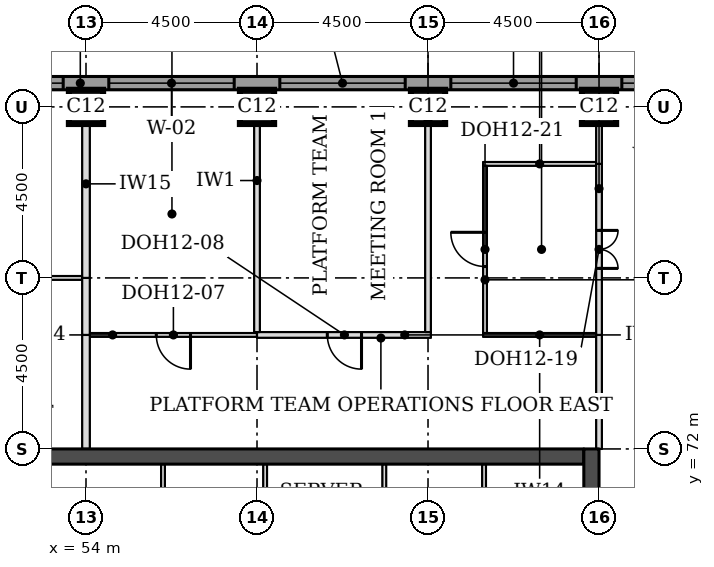
"""IFC4 building model, lengths in metres.
Left out: names, types, materials, properties, quantities, classifications, styles, units other than length and angle.
Written with IfcOpenShell. Run it as: python <this file> out.ifc"""

import sys

from ifc_helpers import new_model, si_unit, direction, frame, frame_2d, origin, origin_2d, place, context, subcontext, project, spatial, rectangle, extrude, element, fill, save


model = new_model("IFC4")
c1 = context("Model", 3, precision=1e-05, world=origin(), true_north=direction((0.0, 1.0)))
c2 = subcontext(c1, "Body", "Model", "MODEL_VIEW")
j1 = project(units=[si_unit("LENGTHUNIT", "METRE"), si_unit("PLANEANGLEUNIT", "RADIAN")], contexts=[c1])
p1 = place(None, origin())
s1 = spatial("IfcSite", under=j1, at=p1, CompositionType="ELEMENT")
p2 = place(p1, origin())
s2 = spatial("IfcBuilding", under=s1, at=p2, CompositionType="ELEMENT")
p3 = place(p2, frame((0.0, 0.0, 248.9)))
s3 = spatial("IfcBuildingStorey", under=s2, at=p3, CompositionType="ELEMENT", Elevation=248.9)
for number, where, z_axis, x_axis in (
    (1, (54.0, 81.0, 0.0), (0.0, 0.0, 1.0), (1.0, 0.0, 0.0)),
    (2, (58.5, 81.0, 0.0), (0.0, 0.0, 1.0), (1.0, 0.0, 0.0)),
    (3, (63.0, 81.0, 0.0), (0.0, 0.0, 1.0), (1.0, 0.0, 0.0)),
    (4, (67.5, 81.0, 0.0), (0.0, 0.0, 1.0), (1.0, 0.0, 0.0)),
):
    element("IfcColumn", number, at=place(p3, frame(where, z_axis=z_axis, x_axis=x_axis)), inside=s3, PredefinedType="COLUMN", context=c2, shape_type="SweptSolid", body=[
        extrude(rectangle(XDim=0.9, YDim=0.9, at=origin_2d()), origin(), (0.0, 0.0, 1.0), 3.7),
    ])
p4 = place(p3, frame((45.4, 71.8, 0.0), z_axis=(0.0, 0.0, 1.0), x_axis=(1.0, 0.0, 0.0)))
e5 = element("IfcWall", 5, at=p4, inside=s3, PredefinedType="SHEAR", context=c2, shape_type="SweptSolid", body=[
    extrude(rectangle(XDim=21.7, YDim=0.4, at=frame_2d((10.85, 0.0))), origin(), (0.0, 0.0, 1.0), 3.7),
])
p5 = place(p3, frame((67.3, 49.5, 0.0), z_axis=(0.0, 0.0, 1.0), x_axis=(0.0, 1.0, 0.0)))
e6 = element("IfcWall", 6, at=p5, inside=s3, PredefinedType="SHEAR", context=c2, shape_type="SweptSolid", body=[
    extrude(rectangle(XDim=22.5, YDim=0.4, at=frame_2d((11.25, 0.0))), origin(), (0.0, 0.0, 1.0), 3.7),
])
p6 = place(p5, frame((4.2, 0.0, 0.0)))
e7 = element("IfcOpeningElement", 7, at=p6, cuts=e6, PredefinedType="OPENING", context=c2, shape_type="SweptSolid", body=[
    extrude(rectangle(XDim=1.8, YDim=2.1, at=frame_2d((0.9, 1.05))), frame((0.0, 0.21, 0.0), z_axis=(0.0, -1.0, 0.0), x_axis=(1.0, 0.0, 0.0)), (0.0, 0.0, 1.0), 0.42),
])
p7 = place(p5, frame((6.9, 0.0, 0.0)))
e8 = element("IfcOpeningElement", 8, at=p7, cuts=e6, PredefinedType="OPENING", context=c2, shape_type="SweptSolid", body=[
    extrude(rectangle(XDim=1.1, YDim=2.1, at=frame_2d((0.55, 1.05))), frame((0.0, 0.21, 0.0), z_axis=(0.0, -1.0, 0.0), x_axis=(1.0, 0.0, 0.0)), (0.0, 0.0, 1.0), 0.42),
])
p8 = place(p5, frame((13.6, 0.0, 0.0)))
e9 = element("IfcOpeningElement", 9, at=p8, cuts=e6, PredefinedType="OPENING", context=c2, shape_type="SweptSolid", body=[
    extrude(rectangle(XDim=1.1, YDim=2.1, at=frame_2d((0.55, 1.05))), frame((0.0, 0.21, 0.0), z_axis=(0.0, -1.0, 0.0), x_axis=(1.0, 0.0, 0.0)), (0.0, 0.0, 1.0), 0.42),
])
p9 = place(p5, frame((16.5, 0.0, 0.0)))
e10 = element("IfcOpeningElement", 10, at=p9, cuts=e6, PredefinedType="OPENING", context=c2, shape_type="SweptSolid", body=[
    extrude(rectangle(XDim=1.8, YDim=2.1, at=frame_2d((0.9, 1.05))), frame((0.0, 0.21, 0.0), z_axis=(0.0, -1.0, 0.0), x_axis=(1.0, 0.0, 0.0)), (0.0, 0.0, 1.0), 0.42),
])
p10 = place(p3, frame((72.331, 81.625, 0.0), z_axis=(0.0, 0.0, 1.0), x_axis=(-1.0, 0.0, 0.0)))
e11 = element("IfcWall", 11, at=p10, inside=s3, PredefinedType="STANDARD", context=c2, shape_type="SweptSolid", body=[
    extrude(rectangle(XDim=32.163, YDim=0.35, at=frame_2d((16.081, 0.0))), origin(), (0.0, 0.0, 1.0), 3.525),
])
p11 = place(p10, frame((0.931, 0.0, 0.9)))
e12 = element("IfcOpeningElement", 12, at=p11, cuts=e11, PredefinedType="OPENING", context=c2, shape_type="SweptSolid", body=[
    extrude(rectangle(XDim=3.3, YDim=1.9, at=frame_2d((1.65, 0.95))), frame((0.0, 0.185, 0.0), z_axis=(0.0, -1.0, 0.0), x_axis=(1.0, 0.0, 0.0)), (0.0, 0.0, 1.0), 0.37),
])
p12 = place(p10, frame((5.431, 0.0, 0.9)))
e13 = element("IfcOpeningElement", 13, at=p12, cuts=e11, PredefinedType="OPENING", context=c2, shape_type="SweptSolid", body=[
    extrude(rectangle(XDim=3.3, YDim=1.9, at=frame_2d((1.65, 0.95))), frame((0.0, 0.185, 0.0), z_axis=(0.0, -1.0, 0.0), x_axis=(1.0, 0.0, 0.0)), (0.0, 0.0, 1.0), 0.37),
])
p13 = place(p10, frame((9.931, 0.0, 0.9)))
e14 = element("IfcOpeningElement", 14, at=p13, cuts=e11, PredefinedType="OPENING", context=c2, shape_type="SweptSolid", body=[
    extrude(rectangle(XDim=3.3, YDim=1.9, at=frame_2d((1.65, 0.95))), frame((0.0, 0.185, 0.0), z_axis=(0.0, -1.0, 0.0), x_axis=(1.0, 0.0, 0.0)), (0.0, 0.0, 1.0), 0.37),
])
p14 = place(p10, frame((14.431, 0.0, 0.9)))
e15 = element("IfcOpeningElement", 15, at=p14, cuts=e11, PredefinedType="OPENING", context=c2, shape_type="SweptSolid", body=[
    extrude(rectangle(XDim=3.3, YDim=1.9, at=frame_2d((1.65, 0.95))), frame((0.0, 0.185, 0.0), z_axis=(0.0, -1.0, 0.0), x_axis=(1.0, 0.0, 0.0)), (0.0, 0.0, 1.0), 0.37),
])
p15 = place(p10, frame((18.931, 0.0, 0.9)))
e16 = element("IfcOpeningElement", 16, at=p15, cuts=e11, PredefinedType="OPENING", context=c2, shape_type="SweptSolid", body=[
    extrude(rectangle(XDim=3.3, YDim=1.9, at=frame_2d((1.65, 0.95))), frame((0.0, 0.185, 0.0), z_axis=(0.0, -1.0, 0.0), x_axis=(1.0, 0.0, 0.0)), (0.0, 0.0, 1.0), 0.37),
])
p16 = place(p10, frame((23.431, 0.0, 0.9)))
e17 = element("IfcOpeningElement", 17, at=p16, cuts=e11, PredefinedType="OPENING", context=c2, shape_type="SweptSolid", body=[
    extrude(rectangle(XDim=3.3, YDim=1.9, at=frame_2d((1.65, 0.95))), frame((0.0, 0.185, 0.0), z_axis=(0.0, -1.0, 0.0), x_axis=(1.0, 0.0, 0.0)), (0.0, 0.0, 1.0), 0.37),
])
p17 = place(p10, frame((27.931, 0.0, 0.9)))
e18 = element("IfcOpeningElement", 18, at=p17, cuts=e11, PredefinedType="OPENING", context=c2, shape_type="SweptSolid", body=[
    extrude(rectangle(XDim=3.3, YDim=1.9, at=frame_2d((1.65, 0.95))), frame((0.0, 0.185, 0.0), z_axis=(0.0, -1.0, 0.0), x_axis=(1.0, 0.0, 0.0)), (0.0, 0.0, 1.0), 0.37),
])
p18 = place(p3, frame((54.1, 75.0, 0.0), z_axis=(0.0, 0.0, 1.0), x_axis=(1.0, 0.0, 0.0)))
e19 = element("IfcWall", 19, at=p18, inside=s3, PredefinedType="PARTITIONING", context=c2, shape_type="SweptSolid", body=[
    extrude(rectangle(XDim=4.4, YDim=0.1, at=frame_2d((2.2, 0.0))), origin(), (0.0, 0.0, 1.0), 3.55),
])
p19 = place(p18, frame((1.75, 0.0, 0.0)))
e20 = element("IfcOpeningElement", 20, at=p19, cuts=e19, PredefinedType="OPENING", context=c2, shape_type="SweptSolid", body=[
    extrude(rectangle(XDim=0.9, YDim=2.1, at=frame_2d((0.45, 1.05))), frame((0.0, 0.06, 0.0), z_axis=(0.0, -1.0, 0.0), x_axis=(1.0, 0.0, 0.0)), (0.0, 0.0, 1.0), 0.12),
])
p20 = place(p3, frame((58.5, 75.0, 0.0), z_axis=(0.0, 0.0, 1.0), x_axis=(1.0, 0.0, 0.0)))
e21 = element("IfcWall", 21, at=p20, inside=s3, PredefinedType="PARTITIONING", context=c2, shape_type="SweptSolid", body=[
    extrude(rectangle(XDim=4.575, YDim=0.15, at=frame_2d((2.288, 0.0))), origin(), (0.0, 0.0, 1.0), 3.55),
])
p21 = place(p20, frame((1.85, 0.0, 0.0)))
e22 = element("IfcOpeningElement", 22, at=p21, cuts=e21, PredefinedType="OPENING", context=c2, shape_type="SweptSolid", body=[
    extrude(rectangle(XDim=0.9, YDim=2.1, at=frame_2d((0.45, 1.05))), frame((0.0, 0.085, 0.0), z_axis=(0.0, -1.0, 0.0), x_axis=(1.0, 0.0, 0.0)), (0.0, 0.0, 1.0), 0.17),
])
p22 = place(p3, frame((64.45, 75.0, 0.0), z_axis=(0.0, 0.0, 1.0), x_axis=(1.0, 0.0, 0.0)))
e23 = element("IfcWall", 23, at=p22, inside=s3, PredefinedType="PARTITIONING", context=c2, shape_type="SweptSolid", body=[
    extrude(rectangle(XDim=2.975, YDim=0.1, at=frame_2d((1.488, 0.0))), origin(), (0.0, 0.0, 1.0), 3.55),
])
p23 = place(p3, frame((49.45, 76.5, 0.0), z_axis=(0.0, 0.0, 1.0), x_axis=(1.0, 0.0, 0.0)))
e24 = element("IfcWall", 24, at=p23, inside=s3, PredefinedType="PARTITIONING", context=c2, shape_type="SweptSolid", body=[
    extrude(rectangle(XDim=4.45, YDim=0.1, at=frame_2d((2.225, 0.0))), origin(), (0.0, 0.0, 1.0), 3.55),
])
p24 = place(p3, frame((64.45, 79.5, 0.0), z_axis=(0.0, 0.0, 1.0), x_axis=(1.0, 0.0, 0.0)))
e25 = element("IfcWall", 25, at=p24, inside=s3, PredefinedType="PARTITIONING", context=c2, shape_type="SweptSolid", body=[
    extrude(rectangle(XDim=2.975, YDim=0.1, at=frame_2d((1.488, 0.0))), origin(), (0.0, 0.0, 1.0), 3.55),
])
p25 = place(p3, frame((54.0, 72.0, 0.0), z_axis=(0.0, 0.0, 1.0), x_axis=(0.0, 1.0, 0.0)))
e26 = element("IfcWall", 26, at=p25, inside=s3, PredefinedType="PARTITIONING", context=c2, shape_type="SweptSolid", body=[
    extrude(rectangle(XDim=3.0, YDim=0.2, at=frame_2d((1.5, 0.0))), origin(), (0.0, 0.0, 1.0), 3.55),
])
p26 = place(p3, frame((67.5, 72.0, 0.0), z_axis=(0.0, 0.0, 1.0), x_axis=(0.0, 1.0, 0.0)))
e27 = element("IfcWall", 27, at=p26, inside=s3, PredefinedType="PARTITIONING", context=c2, shape_type="SweptSolid", body=[
    extrude(rectangle(XDim=3.0, YDim=0.15, at=frame_2d((1.5, 0.0))), origin(), (0.0, 0.0, 1.0), 3.022),
])
p27 = place(p3, frame((54.0, 75.0, 0.0), z_axis=(0.0, 0.0, 1.0), x_axis=(0.0, 1.0, 0.0)))
e28 = element("IfcWall", 28, at=p27, inside=s3, PredefinedType="PARTITIONING", context=c2, shape_type="SweptSolid", body=[
    extrude(rectangle(XDim=1.5, YDim=0.2, at=frame_2d((0.75, 0.0))), origin(), (0.0, 0.0, 1.0), 3.55),
])
p28 = place(p3, frame((67.5, 75.0, 0.0), z_axis=(0.0, 0.0, 1.0), x_axis=(0.0, 1.0, 0.0)))
e29 = element("IfcWall", 29, at=p28, inside=s3, PredefinedType="PARTITIONING", context=c2, shape_type="SweptSolid", body=[
    extrude(rectangle(XDim=4.5, YDim=0.15, at=frame_2d((2.25, 0.0))), origin(), (0.0, 0.0, 1.0), 3.022),
])
p29 = place(p28, frame((1.75, 0.0, 0.0)))
e30 = element("IfcOpeningElement", 30, at=p29, cuts=e29, PredefinedType="OPENING", context=c2, shape_type="SweptSolid", body=[
    extrude(rectangle(XDim=1.0, YDim=2.1, at=frame_2d((0.5, 1.05))), frame((0.0, 0.085, 0.0), z_axis=(0.0, -1.0, 0.0), x_axis=(1.0, 0.0, 0.0)), (0.0, 0.0, 1.0), 0.17),
])
p30 = place(p3, frame((64.5, 75.05, 0.0), z_axis=(0.0, 0.0, 1.0), x_axis=(0.0, 1.0, 0.0)))
e31 = element("IfcWall", 31, at=p30, inside=s3, PredefinedType="PARTITIONING", context=c2, shape_type="SweptSolid", body=[
    extrude(rectangle(XDim=4.4, YDim=0.1, at=frame_2d((2.2, 0.0))), origin(), (0.0, 0.0, 1.0), 3.55),
])
p31 = place(p30, frame((1.75, 0.0, 0.0)))
e32 = element("IfcOpeningElement", 32, at=p31, cuts=e31, PredefinedType="OPENING", context=c2, shape_type="SweptSolid", body=[
    extrude(rectangle(XDim=0.9, YDim=2.1, at=frame_2d((0.45, 1.05))), frame((0.0, 0.06, 0.0), z_axis=(0.0, -1.0, 0.0), x_axis=(1.0, 0.0, 0.0)), (0.0, 0.0, 1.0), 0.12),
])
for number, where, z_axis, x_axis in (
    (33, (58.5, 75.075, 0.0), (0.0, 0.0, 1.0), (0.0, 1.0, 0.0)),
    (34, (63.0, 75.075, 0.0), (0.0, 0.0, 1.0), (0.0, 1.0, 0.0)),
):
    element("IfcWall", number, at=place(p3, frame(where, z_axis=z_axis, x_axis=x_axis)), inside=s3, PredefinedType="PARTITIONING", context=c2, shape_type="SweptSolid", body=[
        extrude(rectangle(XDim=6.375, YDim=0.15, at=frame_2d((3.188, 0.0))), origin(), (0.0, 0.0, 1.0), 3.55),
    ])
p32 = place(p3, frame((54.0, 76.5, 0.0), z_axis=(0.0, 0.0, 1.0), x_axis=(0.0, 1.0, 0.0)))
e35 = element("IfcWall", 35, at=p32, inside=s3, PredefinedType="PARTITIONING", context=c2, shape_type="SweptSolid", body=[
    extrude(rectangle(XDim=4.95, YDim=0.2, at=frame_2d((2.475, 0.0))), origin(), (0.0, 0.0, 1.0), 3.55),
])
p33 = place(p3, frame((67.5, 79.5, 0.0), z_axis=(0.0, 0.0, 1.0), x_axis=(0.0, 1.0, 0.0)))
e36 = element("IfcWall", 36, at=p33, inside=s3, PredefinedType="PARTITIONING", context=c2, shape_type="SweptSolid", body=[
    extrude(rectangle(XDim=1.95, YDim=0.15, at=frame_2d((0.975, 0.0))), origin(), (0.0, 0.0, 1.0), 3.022),
])
for number, where, z_axis, x_axis in (
    (37, (56.026, 68.5, 0.0), (0.0, 0.0, 1.0), (0.0, 1.0, 0.0)),
    (38, (58.714, 68.5, 0.0), (0.0, 0.0, 1.0), (0.0, 1.0, 0.0)),
    (39, (61.85, 68.5, 0.0), (0.0, 0.0, 1.0), (0.0, 1.0, 0.0)),
    (40, (64.475, 68.5, 0.0), (0.0, 0.0, 1.0), (0.0, 1.0, 0.0)),
):
    element("IfcWall", number, at=place(p3, frame(where, z_axis=z_axis, x_axis=x_axis)), inside=s3, PredefinedType="PARTITIONING", context=c2, shape_type="SweptSolid", body=[
        extrude(rectangle(XDim=3.1, YDim=0.1, at=frame_2d((1.55, 0.0))), origin(), (0.0, 0.0, 1.0), 3.55),
    ])
p34 = place(p11, origin())
e41 = element("IfcWindow", 41, at=p34, inside=s3, PartitioningType="SINGLE_PANEL", PredefinedType="WINDOW", context=c2, shape_type="SweptSolid", body=[
    extrude(rectangle(XDim=3.3, YDim=1.9, at=frame_2d((1.65, 0.95))), frame((0.0, 0.085, 0.0), z_axis=(0.0, -1.0, 0.0), x_axis=(1.0, 0.0, 0.0)), (0.0, 0.0, 1.0), 0.06),
])
fill(e12, e41)
p35 = place(p12, origin())
e42 = element("IfcWindow", 42, at=p35, inside=s3, PartitioningType="SINGLE_PANEL", PredefinedType="WINDOW", context=c2, shape_type="SweptSolid", body=[
    extrude(rectangle(XDim=3.3, YDim=1.9, at=frame_2d((1.65, 0.95))), frame((0.0, 0.085, 0.0), z_axis=(0.0, -1.0, 0.0), x_axis=(1.0, 0.0, 0.0)), (0.0, 0.0, 1.0), 0.06),
])
fill(e13, e42)
p36 = place(p13, origin())
e43 = element("IfcWindow", 43, at=p36, inside=s3, PartitioningType="SINGLE_PANEL", PredefinedType="WINDOW", context=c2, shape_type="SweptSolid", body=[
    extrude(rectangle(XDim=3.3, YDim=1.9, at=frame_2d((1.65, 0.95))), frame((0.0, 0.085, 0.0), z_axis=(0.0, -1.0, 0.0), x_axis=(1.0, 0.0, 0.0)), (0.0, 0.0, 1.0), 0.06),
])
fill(e14, e43)
p37 = place(p14, origin())
e44 = element("IfcWindow", 44, at=p37, inside=s3, PartitioningType="SINGLE_PANEL", PredefinedType="WINDOW", context=c2, shape_type="SweptSolid", body=[
    extrude(rectangle(XDim=3.3, YDim=1.9, at=frame_2d((1.65, 0.95))), frame((0.0, 0.085, 0.0), z_axis=(0.0, -1.0, 0.0), x_axis=(1.0, 0.0, 0.0)), (0.0, 0.0, 1.0), 0.06),
])
fill(e15, e44)
p38 = place(p15, origin())
e45 = element("IfcWindow", 45, at=p38, inside=s3, PartitioningType="SINGLE_PANEL", PredefinedType="WINDOW", context=c2, shape_type="SweptSolid", body=[
    extrude(rectangle(XDim=3.3, YDim=1.9, at=frame_2d((1.65, 0.95))), frame((0.0, 0.085, 0.0), z_axis=(0.0, -1.0, 0.0), x_axis=(1.0, 0.0, 0.0)), (0.0, 0.0, 1.0), 0.06),
])
fill(e16, e45)
p39 = place(p29, frame((1.0, 0.0, 0.0), z_axis=(0.0, 0.0, 1.0), x_axis=(-1.0, 0.0, 0.0)))
e46 = element("IfcDoor", 46, at=p39, inside=s3, OperationType="DOUBLE_DOOR_SINGLE_SWING", PredefinedType="DOOR", context=c2, shape_type="SweptSolid", body=[
    extrude(rectangle(XDim=1.0, YDim=2.1, at=frame_2d((0.5, 1.05))), frame((0.0, 0.025, 0.0), z_axis=(0.0, -1.0, 0.0), x_axis=(1.0, 0.0, 0.0)), (0.0, 0.0, 1.0), 0.05),
])
fill(e30, e46)
p40 = place(p31, origin())
e47 = element("IfcDoor", 47, at=p40, inside=s3, OperationType="SINGLE_SWING_RIGHT", PredefinedType="DOOR", context=c2, shape_type="SweptSolid", body=[
    extrude(rectangle(XDim=0.9, YDim=2.1, at=frame_2d((0.45, 1.05))), frame((0.0, 0.025, 0.0), z_axis=(0.0, -1.0, 0.0), x_axis=(1.0, 0.0, 0.0)), (0.0, 0.0, 1.0), 0.05),
])
fill(e32, e47)
p41 = place(p19, frame((0.9, 0.0, 0.0), z_axis=(0.0, 0.0, 1.0), x_axis=(-1.0, 0.0, 0.0)))
e48 = element("IfcDoor", 48, at=p41, inside=s3, OperationType="SINGLE_SWING_LEFT", PredefinedType="DOOR", context=c2, shape_type="SweptSolid", body=[
    extrude(rectangle(XDim=0.9, YDim=2.1, at=frame_2d((0.45, 1.05))), frame((0.0, 0.025, 0.0), z_axis=(0.0, -1.0, 0.0), x_axis=(1.0, 0.0, 0.0)), (0.0, 0.0, 1.0), 0.05),
])
fill(e20, e48)
p42 = place(p21, frame((0.9, 0.0, 0.0), z_axis=(0.0, 0.0, 1.0), x_axis=(-1.0, 0.0, 0.0)))
e49 = element("IfcDoor", 49, at=p42, inside=s3, OperationType="SINGLE_SWING_LEFT", PredefinedType="DOOR", context=c2, shape_type="SweptSolid", body=[
    extrude(rectangle(XDim=0.9, YDim=2.1, at=frame_2d((0.45, 1.05))), frame((0.0, 0.025, 0.0), z_axis=(0.0, -1.0, 0.0), x_axis=(1.0, 0.0, 0.0)), (0.0, 0.0, 1.0), 0.05),
])
fill(e22, e49)
save(model, sys.argv[1])
